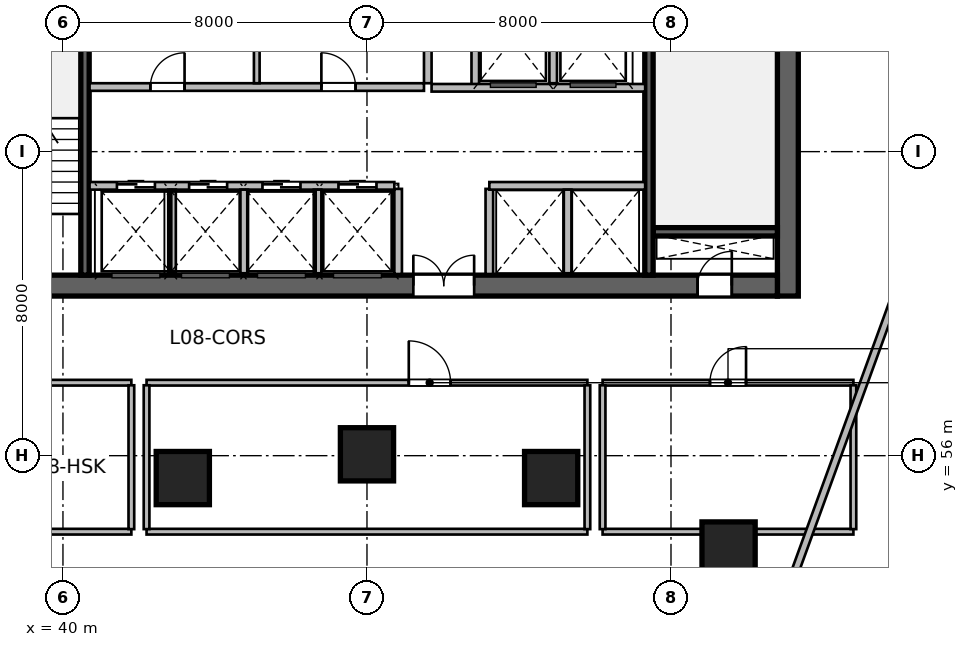
"""IFC4 building model, lengths in metres.
Left out: names, types, materials, properties, quantities, classifications, styles, units other than length and angle.
Written with IfcOpenShell. Run it as: python <this file> out.ifc"""

import sys

from ifc_helpers import new_model, si_unit, direction, frame, frame_2d, origin, origin_2d, place, context, subcontext, project, spatial, rectangle, circle, extrude, source, transform, mapped, element, fill, save


model = new_model("IFC4")
c1 = context("Model", 3, precision=1e-05, world=origin(), true_north=direction((0.0, 1.0)))
c2 = subcontext(c1, "Body", "Model", "MODEL_VIEW")
j1 = project(units=[si_unit("LENGTHUNIT", "METRE"), si_unit("PLANEANGLEUNIT", "RADIAN")], contexts=[c1])
p1 = place(None, origin())
s1 = spatial("IfcSite", under=j1, at=p1, CompositionType="ELEMENT")
p2 = place(p1, origin())
s2 = spatial("IfcBuilding", under=s1, at=p2, CompositionType="ELEMENT")
p3 = place(p2, frame((0.0, 0.0, 42.6)))
s3 = spatial("IfcBuildingStorey", under=s2, at=p3, CompositionType="ELEMENT", Elevation=42.6)
m1 = source(origin(), c2, "Body", "SweptSolid", [
    extrude(rectangle(XDim=12.0, YDim=0.55, at=frame_2d((6.0, 0.0))), origin(), (0.0, 0.0, 1.0), 3.6),
])
p4 = place(p3, frame((59.075, 60.2, 0.0), z_axis=(0.0, 0.0, 1.0), x_axis=(0.0, 1.0, 0.0)))
e1 = element("IfcWall", 1, at=p4, inside=s3, PredefinedType="SHEAR", context=c2, shape_type="MappedRepresentation", body=[
    mapped(m1, transform((0.0, 0.0, 0.0), scale=1.0)),
])
m2 = source(origin(), c2, "Body", "SweptSolid", [
    extrude(rectangle(XDim=21.6, YDim=0.55, at=frame_2d((10.8, 0.0))), origin(), (0.0, 0.0, 1.0), 3.6),
])
p5 = place(p3, frame((37.2, 60.475, 0.0), z_axis=(0.0, 0.0, 1.0), x_axis=(1.0, 0.0, 0.0)))
e2 = element("IfcWall", 2, at=p5, inside=s3, PredefinedType="SHEAR", context=c2, shape_type="MappedRepresentation", body=[
    mapped(m2, transform((0.0, 0.0, 0.0), scale=1.0)),
])
p6 = place(p5, frame((1.1, 0.0, 0.0)))
e3 = element("IfcOpeningElement", 3, at=p6, cuts=e2, PredefinedType="OPENING", context=c2, shape_type="SweptSolid", body=[
    extrude(rectangle(XDim=1.15, YDim=2.15, at=frame_2d((0.575, 1.075))), frame((0.0, 0.285, 0.0), z_axis=(0.0, -1.0, 0.0), x_axis=(1.0, 0.0, 0.0)), (0.0, 0.0, 1.0), 0.57),
])
p7 = place(p5, frame((19.5, 0.0, 0.0)))
e4 = element("IfcOpeningElement", 4, at=p7, cuts=e2, PredefinedType="OPENING", context=c2, shape_type="SweptSolid", body=[
    extrude(rectangle(XDim=0.9, YDim=2.1, at=frame_2d((0.45, 1.05))), frame((0.0, 0.285, 0.0), z_axis=(0.0, -1.0, 0.0), x_axis=(1.0, 0.0, 0.0)), (0.0, 0.0, 1.0), 0.57),
])
p8 = place(p5, frame((12.02, 0.0, 0.0)))
e5 = element("IfcOpeningElement", 5, at=p8, cuts=e2, PredefinedType="OPENING", context=c2, shape_type="SweptSolid", body=[
    extrude(rectangle(XDim=1.6, YDim=2.15, at=frame_2d((0.8, 1.075))), frame((0.0, 0.285, 0.0), z_axis=(0.0, -1.0, 0.0), x_axis=(1.0, 0.0, 0.0)), (0.0, 0.0, 1.0), 0.57),
])
m3 = source(origin(), c2, "Body", "SweptSolid", [
    extrude(rectangle(XDim=3.27, YDim=0.22, at=frame_2d((1.635, 0.0))), origin(), (0.0, 0.0, 1.0), 3.6),
])
p9 = place(p3, frame((55.53, 61.89, 0.0), z_axis=(0.0, 0.0, 1.0), x_axis=(1.0, 0.0, 0.0)))
e6 = element("IfcWall", 6, at=p9, inside=s3, PredefinedType="SHEAR", context=c2, shape_type="MappedRepresentation", body=[
    mapped(m3, transform((0.0, 0.0, 0.0), scale=1.0)),
])
m4 = source(origin(), c2, "Body", "SweptSolid", [
    extrude(rectangle(XDim=10.9, YDim=0.22, at=frame_2d((5.45, 0.0))), origin(), (0.0, 0.0, 1.0), 3.6),
])
p10 = place(p3, frame((40.58, 60.75, 0.0), z_axis=(0.0, 0.0, 1.0), x_axis=(0.0, 1.0, 0.0)))
e7 = element("IfcWall", 7, at=p10, inside=s3, PredefinedType="SHEAR", context=c2, shape_type="MappedRepresentation", body=[
    mapped(m4, transform((0.0, 0.0, 0.0), scale=1.0)),
])
p11 = place(p3, frame((55.42, 60.75, 0.0), z_axis=(0.0, 0.0, 1.0), x_axis=(0.0, 1.0, 0.0)))
e8 = element("IfcWall", 8, at=p11, inside=s3, PredefinedType="SHEAR", context=c2, shape_type="MappedRepresentation", body=[
    mapped(m4, transform((0.0, 0.0, 0.0), scale=1.0)),
])
p12 = place(p11, frame((9.495, 0.0, 0.0)))
e9 = element("IfcOpeningElement", 9, at=p12, cuts=e8, PredefinedType="OPENING", context=c2, shape_type="SweptSolid", body=[
    extrude(rectangle(XDim=1.15, YDim=2.15, at=frame_2d((0.575, 1.075))), frame((0.0, 0.12, 0.0), z_axis=(0.0, -1.0, 0.0), x_axis=(1.0, 0.0, 0.0)), (0.0, 0.0, 1.0), 0.24),
])
m5 = source(origin(), c2, "Body", "SweptSolid", [
    extrude(circle(Radius=0.7, at=origin_2d()), origin(), (0.0, 0.0, 1.0), 3.6),
])
for number, where, z_axis, x_axis in (
    (10, (43.154, 55.411, 0.0), (0.0, 0.0, 1.0), (-0.143, 0.99, 0.0)),
    (11, (48.0, 56.036, 0.0), (0.0, 0.0, 1.0), (0.0, 1.0, 0.0)),
    (12, (52.846, 55.411, 0.0), (0.0, 0.0, 1.0), (0.143, 0.99, 0.0)),
    (13, (57.515, 53.558, 0.0), (0.0, 0.0, 1.0), (0.289, 0.957, 0.0)),
):
    element("IfcColumn", number, at=place(p3, frame(where, z_axis=z_axis, x_axis=x_axis)), inside=s3, PredefinedType="COLUMN", context=c2, shape_type="MappedRepresentation", body=[
        mapped(m5, transform((0.0, 0.0, 0.0), scale=1.0)),
    ])
m6 = source(origin(), c2, "Body", "SweptSolid", [
    extrude(rectangle(XDim=2.24, YDim=0.2, at=frame_2d((1.12, 0.0))), origin(), (0.0, 0.0, 1.0), 3.36),
])
for number, where, z_axis, x_axis in (
    (14, (48.82, 60.78, 0.0), (0.0, 0.0, 1.0), (0.0, 1.0, 0.0)),
    (15, (51.22, 60.78, 0.0), (0.0, 0.0, 1.0), (0.0, 1.0, 0.0)),
):
    element("IfcWall", number, at=place(p3, frame(where, z_axis=z_axis, x_axis=x_axis)), inside=s3, PredefinedType="SOLIDWALL", context=c2, shape_type="MappedRepresentation", body=[
        mapped(m6, transform((0.0, 0.0, 0.0), scale=1.0)),
    ])
m7 = source(origin(), c2, "Body", "SweptSolid", [
    extrude(rectangle(XDim=5.8, YDim=0.2, at=frame_2d((2.9, 0.0))), origin(), (0.0, 0.0, 1.0), 3.36),
])
p13 = place(p3, frame((49.6, 65.8, 0.0), z_axis=(0.0, 0.0, 1.0), x_axis=(0.0, 1.0, 0.0)))
e16 = element("IfcWall", 16, at=p13, inside=s3, PredefinedType="SOLIDWALL", context=c2, shape_type="MappedRepresentation", body=[
    mapped(m7, transform((0.0, 0.0, 0.0), scale=1.0)),
])
m8 = source(origin(), c2, "Body", "SweptSolid", [
    extrude(rectangle(XDim=2.58, YDim=0.2, at=frame_2d((1.29, 0.0))), origin(), (0.0, 0.0, 1.0), 3.36),
])
p14 = place(p3, frame((50.85, 65.68, 0.0), z_axis=(0.0, 0.0, 1.0), x_axis=(0.0, 1.0, 0.0)))
e17 = element("IfcWall", 17, at=p14, inside=s3, PredefinedType="SOLIDWALL", context=c2, shape_type="MappedRepresentation", body=[
    mapped(m8, transform((0.0, 0.0, 0.0), scale=1.0)),
])
m9 = source(origin(), c2, "Body", "SweptSolid", [
    extrude(rectangle(XDim=2.4, YDim=0.2, at=frame_2d((1.2, 0.0))), origin(), (0.0, 0.0, 1.0), 3.36),
])
p15 = place(p3, frame((52.9, 65.8, 0.0), z_axis=(0.0, 0.0, 1.0), x_axis=(0.0, 1.0, 0.0)))
e18 = element("IfcWall", 18, at=p15, inside=s3, PredefinedType="SOLIDWALL", context=c2, shape_type="MappedRepresentation", body=[
    mapped(m9, transform((0.0, 0.0, 0.0), scale=1.0)),
])
m10 = source(origin(), c2, "Body", "SweptSolid", [
    extrude(rectangle(XDim=5.62, YDim=0.2, at=frame_2d((2.81, 0.0))), origin(), (0.0, 0.0, 1.0), 3.36),
])
p16 = place(p3, frame((49.7, 65.68, 0.0), z_axis=(0.0, 0.0, 1.0), x_axis=(1.0, 0.0, 0.0)))
e19 = element("IfcWall", 19, at=p16, inside=s3, PredefinedType="SOLIDWALL", context=c2, shape_type="MappedRepresentation", body=[
    mapped(m10, transform((0.0, 0.0, 0.0), scale=1.0)),
])
m11 = source(origin(), c2, "Body", "SweptSolid", [
    extrude(rectangle(XDim=8.02, YDim=0.2, at=frame_2d((4.01, 0.0))), origin(), (0.0, 0.0, 1.0), 3.36),
])
p17 = place(p3, frame((40.7, 63.1, 0.0), z_axis=(0.0, 0.0, 1.0), x_axis=(1.0, 0.0, 0.0)))
e20 = element("IfcWall", 20, at=p17, inside=s3, PredefinedType="SOLIDWALL", context=c2, shape_type="MappedRepresentation", body=[
    mapped(m11, transform((0.0, 0.0, 0.0), scale=1.0)),
])
p18 = place(p17, frame((0.72, 0.0, 0.0)))
e21 = element("IfcOpeningElement", 21, at=p18, cuts=e20, PredefinedType="OPENING", context=c2, shape_type="SweptSolid", body=[
    extrude(rectangle(XDim=1.0, YDim=2.15, at=frame_2d((0.5, 1.075))), frame((0.0, 0.11, 0.0), z_axis=(0.0, -1.0, 0.0), x_axis=(1.0, 0.0, 0.0)), (0.0, 0.0, 1.0), 0.22),
])
p19 = place(p17, frame((2.62, 0.0, 0.0)))
e22 = element("IfcOpeningElement", 22, at=p19, cuts=e20, PredefinedType="OPENING", context=c2, shape_type="SweptSolid", body=[
    extrude(rectangle(XDim=1.0, YDim=2.15, at=frame_2d((0.5, 1.075))), frame((0.0, 0.11, 0.0), z_axis=(0.0, -1.0, 0.0), x_axis=(1.0, 0.0, 0.0)), (0.0, 0.0, 1.0), 0.22),
])
p20 = place(p17, frame((4.55, 0.0, 0.0)))
e23 = element("IfcOpeningElement", 23, at=p20, cuts=e20, PredefinedType="OPENING", context=c2, shape_type="SweptSolid", body=[
    extrude(rectangle(XDim=1.0, YDim=2.15, at=frame_2d((0.5, 1.075))), frame((0.0, 0.11, 0.0), z_axis=(0.0, -1.0, 0.0), x_axis=(1.0, 0.0, 0.0)), (0.0, 0.0, 1.0), 0.22),
])
p21 = place(p17, frame((6.55, 0.0, 0.0)))
e24 = element("IfcOpeningElement", 24, at=p21, cuts=e20, PredefinedType="OPENING", context=c2, shape_type="SweptSolid", body=[
    extrude(rectangle(XDim=1.0, YDim=2.15, at=frame_2d((0.5, 1.075))), frame((0.0, 0.11, 0.0), z_axis=(0.0, -1.0, 0.0), x_axis=(1.0, 0.0, 0.0)), (0.0, 0.0, 1.0), 0.22),
])
m12 = source(origin(), c2, "Body", "SweptSolid", [
    extrude(rectangle(XDim=4.1, YDim=0.2, at=frame_2d((2.05, 0.0))), origin(), (0.0, 0.0, 1.0), 3.36),
])
p22 = place(p3, frame((51.22, 63.1, 0.0), z_axis=(0.0, 0.0, 1.0), x_axis=(1.0, 0.0, 0.0)))
e25 = element("IfcWall", 25, at=p22, inside=s3, PredefinedType="SOLIDWALL", context=c2, shape_type="MappedRepresentation", body=[
    mapped(m12, transform((0.0, 0.0, 0.0), scale=1.0)),
])
m13 = source(origin(), c2, "Body", "SweptSolid", [
    extrude(rectangle(XDim=2.2, YDim=0.2, at=frame_2d((1.1, 0.0))), origin(), (0.0, 0.0, 1.0), 3.36),
])
for number, where, z_axis, x_axis in (
    (26, (42.87, 60.8, 0.0), (0.0, 0.0, 1.0), (0.0, 1.0, 0.0)),
    (27, (44.77, 60.8, 0.0), (0.0, 0.0, 1.0), (0.0, 1.0, 0.0)),
    (28, (46.7, 60.8, 0.0), (0.0, 0.0, 1.0), (0.0, 1.0, 0.0)),
    (29, (53.28, 60.8, 0.0), (0.0, 0.0, 1.0), (0.0, 1.0, 0.0)),
):
    element("IfcWall", number, at=place(p3, frame(where, z_axis=z_axis, x_axis=x_axis)), inside=s3, PredefinedType="SOLIDWALL", context=c2, shape_type="MappedRepresentation", body=[
        mapped(m13, transform((0.0, 0.0, 0.0), scale=1.0)),
    ])
m14 = source(origin(), c2, "Body", "SweptSolid", [
    extrude(rectangle(XDim=8.8, YDim=0.2, at=frame_2d((4.4, 0.0))), origin(), (0.0, 0.0, 1.0), 3.36),
])
p23 = place(p3, frame((40.7, 65.7, 0.0), z_axis=(0.0, 0.0, 1.0), x_axis=(1.0, 0.0, 0.0)))
e30 = element("IfcWall", 30, at=p23, inside=s3, PredefinedType="SOLIDWALL", context=c2, shape_type="MappedRepresentation", body=[
    mapped(m14, transform((0.0, 0.0, 0.0), scale=1.0)),
])
p24 = place(p23, frame((1.6, 0.0, 0.0)))
e31 = element("IfcOpeningElement", 31, at=p24, cuts=e30, PredefinedType="OPENING", context=c2, shape_type="SweptSolid", body=[
    extrude(rectangle(XDim=0.9, YDim=2.1, at=frame_2d((0.45, 1.05))), frame((0.0, 0.11, 0.0), z_axis=(0.0, -1.0, 0.0), x_axis=(1.0, 0.0, 0.0)), (0.0, 0.0, 1.0), 0.22),
])
p25 = place(p23, frame((6.1, 0.0, 0.0)))
e32 = element("IfcOpeningElement", 32, at=p25, cuts=e30, PredefinedType="OPENING", context=c2, shape_type="SweptSolid", body=[
    extrude(rectangle(XDim=0.9, YDim=2.1, at=frame_2d((0.45, 1.05))), frame((0.0, 0.11, 0.0), z_axis=(0.0, -1.0, 0.0), x_axis=(1.0, 0.0, 0.0)), (0.0, 0.0, 1.0), 0.22),
])
m15 = source(origin(), c2, "Body", "SweptSolid", [
    extrude(rectangle(XDim=2.4, YDim=0.15, at=frame_2d((1.2, 0.0))), origin(), (0.0, 0.0, 1.0), 3.36),
])
p26 = place(p3, frame((45.1, 65.8, 0.0), z_axis=(0.0, 0.0, 1.0), x_axis=(0.0, 1.0, 0.0)))
e33 = element("IfcWall", 33, at=p26, inside=s3, PredefinedType="PARTITIONING", context=c2, shape_type="MappedRepresentation", body=[
    mapped(m15, transform((0.0, 0.0, 0.0), scale=1.0)),
])
m16 = source(origin(), c2, "Body", "SweptSolid", [
    extrude(rectangle(XDim=6.6, YDim=0.15, at=frame_2d((3.3, 0.0))), origin(), (0.0, 0.0, 1.0), 2.803),
])
p27 = place(p3, frame((35.2, 54.0, 0.0), z_axis=(0.0, 0.0, 1.0), x_axis=(1.0, 0.0, 0.0)))
e34 = element("IfcWall", 34, at=p27, inside=s3, PredefinedType="PARTITIONING", context=c2, shape_type="MappedRepresentation", body=[
    mapped(m16, transform((0.0, 0.0, 0.0), scale=1.0)),
])
m17 = source(origin(), c2, "Body", "SweptSolid", [
    extrude(rectangle(XDim=6.6, YDim=0.15, at=frame_2d((3.3, 0.0))), origin(), (0.0, 0.0, 1.0), 3.36),
])
p28 = place(p3, frame((35.2, 57.92, 0.0), z_axis=(0.0, 0.0, 1.0), x_axis=(1.0, 0.0, 0.0)))
e35 = element("IfcWall", 35, at=p28, inside=s3, PredefinedType="PARTITIONING", context=c2, shape_type="MappedRepresentation", body=[
    mapped(m17, transform((0.0, 0.0, 0.0), scale=1.0)),
])
p29 = place(p28, frame((2.85, 0.0, 0.0)))
e36 = element("IfcOpeningElement", 36, at=p29, cuts=e35, PredefinedType="OPENING", context=c2, shape_type="SweptSolid", body=[
    extrude(rectangle(XDim=0.9, YDim=2.1, at=frame_2d((0.45, 1.05))), frame((0.0, 0.085, 0.0), z_axis=(0.0, -1.0, 0.0), x_axis=(1.0, 0.0, 0.0)), (0.0, 0.0, 1.0), 0.17),
])
m18 = source(origin(), c2, "Body", "SweptSolid", [
    extrude(rectangle(XDim=3.785, YDim=0.15, at=frame_2d((1.893, 0.0))), origin(), (0.0, 0.0, 1.0), 3.36),
])
p30 = place(p3, frame((41.8, 54.067, 0.0), z_axis=(0.0, 0.0, 1.0), x_axis=(0.0, 1.0, 0.0)))
e37 = element("IfcWall", 37, at=p30, inside=s3, PredefinedType="PARTITIONING", context=c2, shape_type="MappedRepresentation", body=[
    mapped(m18, transform((0.0, 0.0, 0.0), scale=1.0)),
])
m19 = source(origin(), c2, "Body", "SweptSolid", [
    extrude(rectangle(XDim=11.6, YDim=0.15, at=frame_2d((5.8, 0.0))), origin(), (0.0, 0.0, 1.0), 3.36),
])
p31 = place(p3, frame((42.2, 54.0, 0.0), z_axis=(0.0, 0.0, 1.0), x_axis=(1.0, 0.0, 0.0)))
e38 = element("IfcWall", 38, at=p31, inside=s3, PredefinedType="PARTITIONING", context=c2, shape_type="MappedRepresentation", body=[
    mapped(m19, transform((0.0, 0.0, 0.0), scale=1.0)),
])
p32 = place(p3, frame((42.2, 57.92, 0.0), z_axis=(0.0, 0.0, 1.0), x_axis=(1.0, 0.0, 0.0)))
e39 = element("IfcWall", 39, at=p32, inside=s3, PredefinedType="PARTITIONING", context=c2, shape_type="MappedRepresentation", body=[
    mapped(m19, transform((0.0, 0.0, 0.0), scale=1.0)),
])
p33 = place(p32, frame((6.9, 0.0, 0.0)))
e40 = element("IfcOpeningElement", 40, at=p33, cuts=e39, PredefinedType="OPENING", context=c2, shape_type="SweptSolid", body=[
    extrude(rectangle(XDim=1.1, YDim=2.15, at=frame_2d((0.55, 1.075))), frame((0.0, 0.085, 0.0), z_axis=(0.0, -1.0, 0.0), x_axis=(1.0, 0.0, 0.0)), (0.0, 0.0, 1.0), 0.17),
])
for number, where, z_axis, x_axis in (
    (41, (42.2, 54.067, 0.0), (0.0, 0.0, 1.0), (0.0, 1.0, 0.0)),
    (42, (53.8, 54.067, 0.0), (0.0, 0.0, 1.0), (0.0, 1.0, 0.0)),
):
    element("IfcWall", number, at=place(p3, frame(where, z_axis=z_axis, x_axis=x_axis)), inside=s3, PredefinedType="PARTITIONING", context=c2, shape_type="MappedRepresentation", body=[
        mapped(m18, transform((0.0, 0.0, 0.0), scale=1.0)),
    ])
p34 = place(p3, frame((54.2, 54.0, 0.0), z_axis=(0.0, 0.0, 1.0), x_axis=(1.0, 0.0, 0.0)))
e43 = element("IfcWall", 43, at=p34, inside=s3, PredefinedType="PARTITIONING", context=c2, shape_type="MappedRepresentation", body=[
    mapped(m16, transform((0.0, 0.0, 0.0), scale=1.0)),
])
p35 = place(p3, frame((54.2, 57.92, 0.0), z_axis=(0.0, 0.0, 1.0), x_axis=(1.0, 0.0, 0.0)))
e44 = element("IfcWall", 44, at=p35, inside=s3, PredefinedType="PARTITIONING", context=c2, shape_type="MappedRepresentation", body=[
    mapped(m17, transform((0.0, 0.0, 0.0), scale=1.0)),
])
p36 = place(p35, frame((2.825, 0.0, 0.0)))
e45 = element("IfcOpeningElement", 45, at=p36, cuts=e44, PredefinedType="OPENING", context=c2, shape_type="SweptSolid", body=[
    extrude(rectangle(XDim=0.95, YDim=2.1, at=frame_2d((0.475, 1.05))), frame((0.0, 0.085, 0.0), z_axis=(0.0, -1.0, 0.0), x_axis=(1.0, 0.0, 0.0)), (0.0, 0.0, 1.0), 0.17),
])
for number, where, z_axis, x_axis in (
    (46, (54.2, 54.067, 0.0), (0.0, 0.0, 1.0), (0.0, 1.0, 0.0)),
    (47, (60.8, 54.067, 0.0), (0.0, 0.0, 1.0), (0.0, 1.0, 0.0)),
):
    element("IfcWall", number, at=place(p3, frame(where, z_axis=z_axis, x_axis=x_axis)), inside=s3, PredefinedType="PARTITIONING", context=c2, shape_type="MappedRepresentation", body=[
        mapped(m18, transform((0.0, 0.0, 0.0), scale=1.0)),
    ])
m20 = source(origin(), c2, "Body", "SweptSolid", [
    extrude(rectangle(XDim=12.196, YDim=0.195, at=frame_2d((6.098, 0.0))), origin(), (0.0, 0.0, 1.0), 3.36),
])
p37 = place(p3, frame((57.742, 48.766, 0.0), z_axis=(0.0, 0.0, 1.0), x_axis=(0.342022711534, 0.939691686031, 0.0)))
e48 = element("IfcWall", 48, at=p37, inside=s3, PredefinedType="PARTITIONING", context=c2, shape_type="MappedRepresentation", body=[
    mapped(m20, transform((0.0, 0.0, 0.0), scale=1.0)),
])
m21 = source(origin(), c2, "Body", "SweptSolid", [
    extrude(rectangle(XDim=11.844, YDim=0.195, at=frame_2d((5.922, 0.0))), origin(), (0.0, 0.0, 1.0), 3.36),
])
p38 = place(p3, frame((60.273, 46.848, 0.0), z_axis=(0.0, 0.0, 1.0), x_axis=(0.442871152218, 0.896585267854, 0.0)))
e49 = element("IfcWall", 49, at=p38, inside=s3, PredefinedType="PARTITIONING", context=c2, shape_type="MappedRepresentation", body=[
    mapped(m21, transform((0.0, 0.0, 0.0), scale=1.0)),
])
m22 = source(origin(), c2, "Body", "SweptSolid", [
    extrude(rectangle(XDim=0.9, YDim=2.1, at=frame_2d((0.45, 1.05))), frame((0.0, 0.025, 0.0), z_axis=(0.0, -1.0, 0.0), x_axis=(1.0, 0.0, 0.0)), (0.0, 0.0, 1.0), 0.05),
])
p39 = place(p7, origin())
e50 = element("IfcDoor", 50, at=p39, inside=s3, OperationType="SINGLE_SWING_RIGHT", PredefinedType="DOOR", context=c2, shape_type="MappedRepresentation", body=[
    mapped(m22, transform((0.0, 0.0, 0.0), scale=1.0)),
])
fill(e4, e50)
m23 = source(origin(), c2, "Body", "SweptSolid", [
    extrude(rectangle(XDim=1.6, YDim=2.15, at=frame_2d((0.8, 1.075))), frame((0.0, 0.025, 0.0), z_axis=(0.0, -1.0, 0.0), x_axis=(1.0, 0.0, 0.0)), (0.0, 0.0, 1.0), 0.05),
])
p40 = place(p8, origin())
e51 = element("IfcDoor", 51, at=p40, inside=s3, OperationType="DOUBLE_DOOR_SINGLE_SWING", PredefinedType="DOOR", context=c2, shape_type="MappedRepresentation", body=[
    mapped(m23, transform((0.0, 0.0, 0.0), scale=1.0)),
])
fill(e5, e51)
m24 = source(origin(), c2, "Body", "SweptSolid", [
    extrude(rectangle(XDim=1.0, YDim=2.15, at=frame_2d((0.5, 1.075))), frame((0.0, 0.025, 0.0), z_axis=(0.0, -1.0, 0.0), x_axis=(1.0, 0.0, 0.0)), (0.0, 0.0, 1.0), 0.05),
])
p41 = place(p18, origin())
e52 = element("IfcDoor", 52, at=p41, inside=s3, OperationType="DOUBLE_DOOR_SLIDING", PredefinedType="DOOR", context=c2, shape_type="MappedRepresentation", body=[
    mapped(m24, transform((0.0, 0.0, 0.0), scale=1.0)),
])
fill(e21, e52)
p42 = place(p19, origin())
e53 = element("IfcDoor", 53, at=p42, inside=s3, OperationType="DOUBLE_DOOR_SLIDING", PredefinedType="DOOR", context=c2, shape_type="MappedRepresentation", body=[
    mapped(m24, transform((0.0, 0.0, 0.0), scale=1.0)),
])
fill(e22, e53)
p43 = place(p20, origin())
e54 = element("IfcDoor", 54, at=p43, inside=s3, OperationType="DOUBLE_DOOR_SLIDING", PredefinedType="DOOR", context=c2, shape_type="MappedRepresentation", body=[
    mapped(m24, transform((0.0, 0.0, 0.0), scale=1.0)),
])
fill(e23, e54)
p44 = place(p21, origin())
e55 = element("IfcDoor", 55, at=p44, inside=s3, OperationType="DOUBLE_DOOR_SLIDING", PredefinedType="DOOR", context=c2, shape_type="MappedRepresentation", body=[
    mapped(m24, transform((0.0, 0.0, 0.0), scale=1.0)),
])
fill(e24, e55)
p45 = place(p24, origin())
e56 = element("IfcDoor", 56, at=p45, inside=s3, OperationType="SINGLE_SWING_RIGHT", PredefinedType="DOOR", context=c2, shape_type="MappedRepresentation", body=[
    mapped(m22, transform((0.0, 0.0, 0.0), scale=1.0)),
])
fill(e31, e56)
p46 = place(p25, origin())
e57 = element("IfcDoor", 57, at=p46, inside=s3, OperationType="SINGLE_SWING_LEFT", PredefinedType="DOOR", context=c2, shape_type="MappedRepresentation", body=[
    mapped(m22, transform((0.0, 0.0, 0.0), scale=1.0)),
])
fill(e32, e57)
m25 = source(origin(), c2, "Body", "SweptSolid", [
    extrude(rectangle(XDim=1.1, YDim=2.15, at=frame_2d((0.55, 1.075))), frame((0.0, 0.025, 0.0), z_axis=(0.0, -1.0, 0.0), x_axis=(1.0, 0.0, 0.0)), (0.0, 0.0, 1.0), 0.05),
])
p47 = place(p33, origin())
e58 = element("IfcDoor", 58, at=p47, inside=s3, OperationType="SINGLE_SWING_LEFT", PredefinedType="DOOR", context=c2, shape_type="MappedRepresentation", body=[
    mapped(m25, transform((0.0, 0.0, 0.0), scale=1.0)),
])
fill(e40, e58)
m26 = source(origin(), c2, "Body", "SweptSolid", [
    extrude(rectangle(XDim=0.95, YDim=2.1, at=frame_2d((0.475, 1.05))), frame((0.0, 0.025, 0.0), z_axis=(0.0, -1.0, 0.0), x_axis=(1.0, 0.0, 0.0)), (0.0, 0.0, 1.0), 0.05),
])
p48 = place(p36, origin())
e59 = element("IfcDoor", 59, at=p48, inside=s3, OperationType="SINGLE_SWING_RIGHT", PredefinedType="DOOR", context=c2, shape_type="MappedRepresentation", body=[
    mapped(m26, transform((0.0, 0.0, 0.0), scale=1.0)),
])
fill(e45, e59)
save(model, sys.argv[1])
